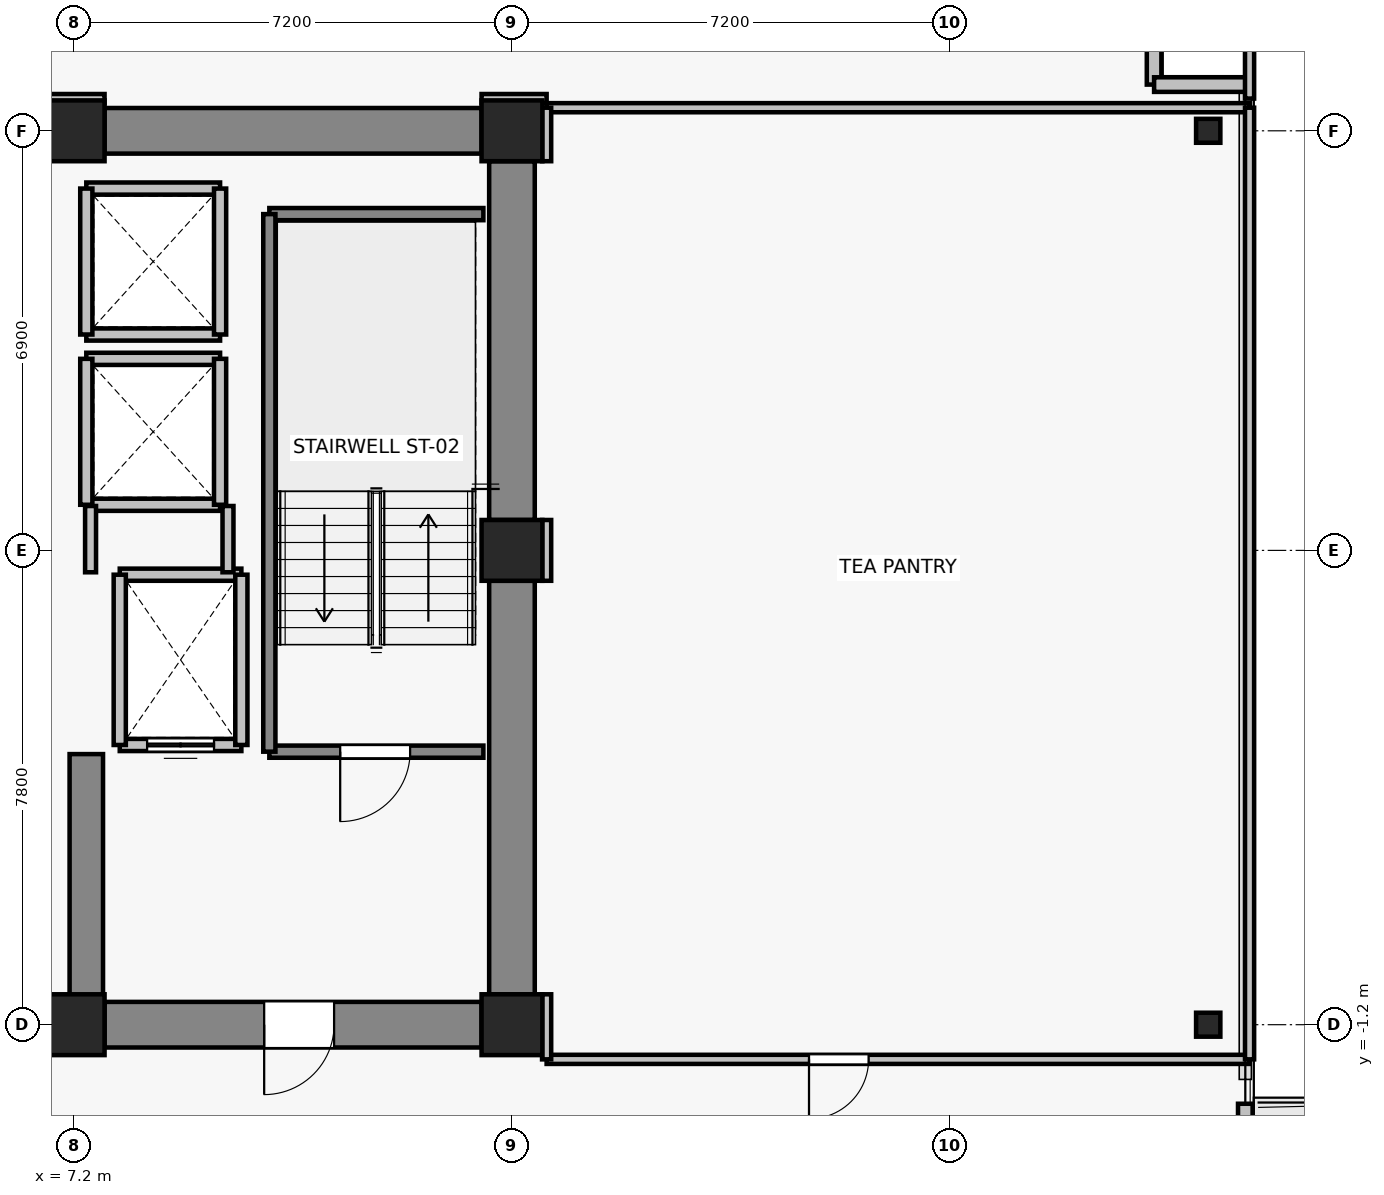
"""IFC4 building model, lengths in metres.
Left out: names, types, materials, properties, quantities, classifications, styles, units other than length and angle.
Written with IfcOpenShell. Run it as: python <this file> out.ifc"""

import sys

from ifc_helpers import new_model, si_unit, direction, frame, frame_2d, origin, origin_2d, place, context, subcontext, project, spatial, rectangle, i_section, extrude, source, transform, mapped, element, fill, save


model = new_model("IFC4")
c1 = context("Model", 3, precision=1e-05, world=origin(), true_north=direction((0.0, 1.0)))
c2 = subcontext(c1, "Body", "Model", "MODEL_VIEW")
j1 = project(units=[si_unit("LENGTHUNIT", "METRE"), si_unit("PLANEANGLEUNIT", "RADIAN")], contexts=[c1])
p1 = place(None, origin())
s1 = spatial("IfcSite", under=j1, at=p1, CompositionType="ELEMENT")
p2 = place(p1, origin())
s2 = spatial("IfcBuilding", under=s1, at=p2, CompositionType="ELEMENT")
p3 = place(p2, frame((0.0, 0.0, 175.9)))
s3 = spatial("IfcBuildingStorey", under=s2, at=p3, CompositionType="ELEMENT", Elevation=175.9)
for number, where, z_axis, x_axis in (
    (1, (7.2, -1.2, 0.0), (0.0, 0.0, 1.0), (1.0, 0.0, 0.0)),
    (2, (14.4, -1.2, 0.0), (0.0, 0.0, 1.0), (1.0, 0.0, 0.0)),
    (3, (14.4, 6.6, 0.0), (0.0, 0.0, 1.0), (1.0, 0.0, 0.0)),
    (4, (7.2, 13.5, 0.0), (0.0, 0.0, 1.0), (1.0, 0.0, 0.0)),
    (5, (14.4, 13.5, 0.0), (0.0, 0.0, 1.0), (1.0, 0.0, 0.0)),
):
    element("IfcColumn", number, at=place(p3, frame(where, z_axis=z_axis, x_axis=x_axis)), inside=s3, PredefinedType="COLUMN", context=c2, shape_type="SweptSolid", body=[
        extrude(rectangle(XDim=1.0, YDim=1.0, at=origin_2d()), origin(), (0.0, 0.0, 1.0), 3.3),
    ])
for number, where, z_axis, x_axis in (
    (6, (25.85, -1.2, 0.0), (0.0, 0.0, 1.0), (1.0, 0.0, 0.0)),
    (7, (25.85, 13.5, 0.0), (0.0, 0.0, 1.0), (1.0, 0.0, 0.0)),
):
    element("IfcColumn", number, at=place(p3, frame(where, z_axis=z_axis, x_axis=x_axis)), inside=s3, PredefinedType="COLUMN", context=c2, shape_type="SweptSolid", body=[
        extrude(i_section(OverallWidth=0.399, OverallDepth=0.394, WebThickness=0.023, FlangeThickness=0.037, FilletRadius=0.015, at=origin_2d()), origin(), (0.0, 0.0, 1.0), 3.3),
    ])
p4 = place(p3, frame((7.7, 13.5, 0.0), z_axis=(0.0, 0.0, 1.0), x_axis=(1.0, 0.0, 0.0)))
e8 = element("IfcWall", 8, at=p4, inside=s3, PredefinedType="SHEAR", context=c2, shape_type="SweptSolid", body=[
    extrude(rectangle(XDim=6.2, YDim=0.75, at=frame_2d((3.1, 0.0))), origin(), (0.0, 0.0, 1.0), 3.075),
])
p5 = place(p3, frame((14.4, -0.7, 0.0), z_axis=(0.0, 0.0, 1.0), x_axis=(0.0, 1.0, 0.0)))
e9 = element("IfcWall", 9, at=p5, inside=s3, PredefinedType="SHEAR", context=c2, shape_type="SweptSolid", body=[
    extrude(rectangle(XDim=6.8, YDim=0.75, at=frame_2d((3.4, 0.0))), origin(), (0.0, 0.0, 1.0), 3.075),
])
p6 = place(p3, frame((14.4, 7.1, 0.0), z_axis=(0.0, 0.0, 1.0), x_axis=(0.0, 1.0, 0.0)))
e10 = element("IfcWall", 10, at=p6, inside=s3, PredefinedType="SHEAR", context=c2, shape_type="SweptSolid", body=[
    extrude(rectangle(XDim=5.9, YDim=0.75, at=frame_2d((2.95, 0.0))), origin(), (0.0, 0.0, 1.0), 3.075),
])
p7 = place(p3, frame((13.9, -1.2, 0.0), z_axis=(0.0, 0.0, 1.0), x_axis=(-1.0, 0.0, 0.0)))
e11 = element("IfcWall", 11, at=p7, inside=s3, PredefinedType="SHEAR", context=c2, shape_type="SweptSolid", body=[
    extrude(rectangle(XDim=6.2, YDim=0.75, at=frame_2d((3.1, 0.0))), origin(), (0.0, 0.0, 1.0), 3.075),
])
p8 = place(p7, frame((2.425, 0.0, 0.0)))
e12 = element("IfcOpeningElement", 12, at=p8, cuts=e11, PredefinedType="OPENING", context=c2, shape_type="SweptSolid", body=[
    extrude(rectangle(XDim=1.15, YDim=2.15, at=frame_2d((0.575, 1.075))), frame((0.0, 0.385, 0.0), z_axis=(0.0, -1.0, 0.0), x_axis=(1.0, 0.0, 0.0)), (0.0, 0.0, 1.0), 0.77),
])
p9 = place(p3, frame((7.4, -0.825, 0.0), z_axis=(0.0, 0.0, 1.0), x_axis=(0.0, 1.0, 0.0)))
e13 = element("IfcWall", 13, at=p9, inside=s3, PredefinedType="SHEAR", context=c2, shape_type="SweptSolid", body=[
    extrude(rectangle(XDim=4.075, YDim=0.55, at=frame_2d((2.038, 0.0))), origin(), (0.0, 0.0, 1.0), 3.075),
])
p10 = place(p3, frame((26.46, -2.5, 0.0), z_axis=(0.0, 0.0, 1.0), x_axis=(0.0, -1.0, 0.0)))
e14 = element("IfcWall", 14, at=p10, inside=s3, PredefinedType="SOLIDWALL", context=c2, shape_type="SweptSolid", body=[
    extrude(rectangle(XDim=5.8, YDim=0.24, at=frame_2d((2.9, 0.0))), origin(), (0.0, 0.0, 1.0), 3.075),
])
p11 = place(p10, frame((1.566, 0.0, 0.0)))
e15 = element("IfcOpeningElement", 15, at=p11, cuts=e14, PredefinedType="OPENING", context=c2, shape_type="SweptSolid", body=[
    extrude(rectangle(XDim=1.0, YDim=2.2, at=frame_2d((0.5, 1.1))), frame((0.0, 0.13, 0.0), z_axis=(0.0, -1.0, 0.0), x_axis=(1.0, 0.0, 0.0)), (0.0, 0.0, 1.0), 0.26),
])
p12 = place(p10, frame((2.916, 0.0, 0.85)))
e16 = element("IfcOpeningElement", 16, at=p12, cuts=e14, PredefinedType="OPENING", context=c2, shape_type="SweptSolid", body=[
    extrude(rectangle(XDim=1.5, YDim=1.6, at=frame_2d((0.75, 0.8))), frame((0.0, 0.13, 0.0), z_axis=(0.0, -1.0, 0.0), x_axis=(1.0, 0.0, 0.0)), (0.0, 0.0, 1.0), 0.26),
])
for number, where, z_axis, x_axis in (
    (17, (24.96, 14.26, 0.0), (0.0, 0.0, 1.0), (0.0, 1.0, 0.0)),
    (18, (26.46, 14.26, 0.0), (0.0, 0.0, 1.0), (-1.0, 0.0, 0.0)),
):
    element("IfcWall", number, at=place(p3, frame(where, z_axis=z_axis, x_axis=x_axis)), inside=s3, PredefinedType="SOLIDWALL", context=c2, shape_type="SweptSolid", body=[
        extrude(rectangle(XDim=1.5, YDim=0.24, at=frame_2d((0.75, 0.0))), origin(), (0.0, 0.0, 1.0), 3.075),
    ])
p13 = place(p3, frame((9.95, 3.4, 0.0), z_axis=(0.0, 0.0, 1.0), x_axis=(-1.0, 0.0, 0.0)))
e19 = element("IfcWall", 19, at=p13, inside=s3, PredefinedType="SOLIDWALL", context=c2, shape_type="SweptSolid", body=[
    extrude(rectangle(XDim=2.0, YDim=0.2, at=frame_2d((1.0, 0.0))), origin(), (0.0, 0.0, 1.0), 3.075),
])
p14 = place(p13, frame((0.45, 0.0, 0.0)))
e20 = element("IfcOpeningElement", 20, at=p14, cuts=e19, PredefinedType="OPENING", context=c2, shape_type="SweptSolid", body=[
    extrude(rectangle(XDim=1.1, YDim=2.2, at=frame_2d((0.55, 1.1))), frame((0.0, 0.11, 0.0), z_axis=(0.0, -1.0, 0.0), x_axis=(1.0, 0.0, 0.0)), (0.0, 0.0, 1.0), 0.22),
])
p15 = place(p3, frame((7.95, 6.2, 0.0), z_axis=(0.0, 0.0, 1.0), x_axis=(1.0, 0.0, 0.0)))
e21 = element("IfcWall", 21, at=p15, inside=s3, PredefinedType="SOLIDWALL", context=c2, shape_type="SweptSolid", body=[
    extrude(rectangle(XDim=2.0, YDim=0.2, at=frame_2d((1.0, 0.0))), origin(), (0.0, 0.0, 1.0), 3.075),
])
for number, where, z_axis, x_axis in (
    (22, (7.95, 3.4, 0.0), (0.0, 0.0, 1.0), (0.0, 1.0, 0.0)),
    (23, (9.95, 6.2, 0.0), (0.0, 0.0, 1.0), (0.0, -1.0, 0.0)),
):
    element("IfcWall", number, at=place(p3, frame(where, z_axis=z_axis, x_axis=x_axis)), inside=s3, PredefinedType="SOLIDWALL", context=c2, shape_type="SweptSolid", body=[
        extrude(rectangle(XDim=2.8, YDim=0.2, at=frame_2d((1.4, 0.0))), origin(), (0.0, 0.0, 1.0), 3.075),
    ])
for number, where, z_axis, x_axis in (
    (24, (9.6, 7.35, 0.0), (0.0, 0.0, 1.0), (-1.0, 0.0, 0.0)),
    (25, (7.4, 9.75, 0.0), (0.0, 0.0, 1.0), (1.0, 0.0, 0.0)),
):
    element("IfcWall", number, at=place(p3, frame(where, z_axis=z_axis, x_axis=x_axis)), inside=s3, PredefinedType="SOLIDWALL", context=c2, shape_type="SweptSolid", body=[
        extrude(rectangle(XDim=2.2, YDim=0.2, at=frame_2d((1.1, 0.0))), origin(), (0.0, 0.0, 1.0), 2.565),
    ])
p16 = place(p3, frame((7.4, 7.35, 0.0), z_axis=(0.0, 0.0, 1.0), x_axis=(0.0, 1.0, 0.0)))
e26 = element("IfcWall", 26, at=p16, inside=s3, PredefinedType="SOLIDWALL", context=c2, shape_type="SweptSolid", body=[
    extrude(rectangle(XDim=2.4, YDim=0.2, at=frame_2d((1.2, 0.0))), origin(), (0.0, 0.0, 1.0), 2.565),
])
p17 = place(p3, frame((9.6, 9.75, 0.0), z_axis=(0.0, 0.0, 1.0), x_axis=(0.0, -1.0, 0.0)))
e27 = element("IfcWall", 27, at=p17, inside=s3, PredefinedType="SOLIDWALL", context=c2, shape_type="SweptSolid", body=[
    extrude(rectangle(XDim=2.4, YDim=0.2, at=frame_2d((1.2, 0.0))), origin(), (0.0, 0.0, 1.0), 3.075),
])
for number, where, z_axis, x_axis in (
    (28, (9.6, 10.15, 0.0), (0.0, 0.0, 1.0), (-1.0, 0.0, 0.0)),
    (29, (7.4, 12.55, 0.0), (0.0, 0.0, 1.0), (1.0, 0.0, 0.0)),
):
    element("IfcWall", number, at=place(p3, frame(where, z_axis=z_axis, x_axis=x_axis)), inside=s3, PredefinedType="SOLIDWALL", context=c2, shape_type="SweptSolid", body=[
        extrude(rectangle(XDim=2.2, YDim=0.2, at=frame_2d((1.1, 0.0))), origin(), (0.0, 0.0, 1.0), 2.565),
    ])
p18 = place(p3, frame((7.4, 10.15, 0.0), z_axis=(0.0, 0.0, 1.0), x_axis=(0.0, 1.0, 0.0)))
e30 = element("IfcWall", 30, at=p18, inside=s3, PredefinedType="SOLIDWALL", context=c2, shape_type="SweptSolid", body=[
    extrude(rectangle(XDim=2.4, YDim=0.2, at=frame_2d((1.2, 0.0))), origin(), (0.0, 0.0, 1.0), 2.565),
])
p19 = place(p3, frame((9.6, 12.55, 0.0), z_axis=(0.0, 0.0, 1.0), x_axis=(0.0, -1.0, 0.0)))
e31 = element("IfcWall", 31, at=p19, inside=s3, PredefinedType="SOLIDWALL", context=c2, shape_type="SweptSolid", body=[
    extrude(rectangle(XDim=2.4, YDim=0.2, at=frame_2d((1.2, 0.0))), origin(), (0.0, 0.0, 1.0), 3.075),
])
p20 = place(p3, frame((13.93, 3.29, 0.0), z_axis=(0.0, 0.0, 1.0), x_axis=(-1.0, 0.0, 0.0)))
e32 = element("IfcWall", 32, at=p20, inside=s3, PredefinedType="SOLIDWALL", context=c2, shape_type="SweptSolid", body=[
    extrude(rectangle(XDim=3.52, YDim=0.2, at=frame_2d((1.76, 0.0))), origin(), (0.0, 0.0, 1.0), 3.075),
])
p21 = place(p20, frame((1.205, 0.0, 0.0)))
e33 = element("IfcOpeningElement", 33, at=p21, cuts=e32, PredefinedType="OPENING", context=c2, shape_type="SweptSolid", body=[
    extrude(rectangle(XDim=1.15, YDim=2.15, at=frame_2d((0.575, 1.075))), frame((0.0, 0.11, 0.0), z_axis=(0.0, -1.0, 0.0), x_axis=(1.0, 0.0, 0.0)), (0.0, 0.0, 1.0), 0.22),
])
p22 = place(p3, frame((10.41, 12.13, 0.0), z_axis=(0.0, 0.0, 1.0), x_axis=(1.0, 0.0, 0.0)))
e34 = element("IfcWall", 34, at=p22, inside=s3, PredefinedType="SOLIDWALL", context=c2, shape_type="SweptSolid", body=[
    extrude(rectangle(XDim=3.52, YDim=0.2, at=frame_2d((1.76, 0.0))), origin(), (0.0, 0.0, 1.0), 3.075),
])
p23 = place(p3, frame((10.41, 3.29, 0.0), z_axis=(0.0, 0.0, 1.0), x_axis=(0.0, 1.0, 0.0)))
e35 = element("IfcWall", 35, at=p23, inside=s3, PredefinedType="SOLIDWALL", context=c2, shape_type="SweptSolid", body=[
    extrude(rectangle(XDim=8.84, YDim=0.2, at=frame_2d((4.42, 0.0))), origin(), (0.0, 0.0, 1.0), 3.075),
])
p24 = place(p3, frame((7.47, 6.24, 0.0), z_axis=(0.0, 0.0, 1.0), x_axis=(0.0, 1.0, 0.0)))
e36 = element("IfcWall", 36, at=p24, inside=s3, PredefinedType="PARTITIONING", context=c2, shape_type="SweptSolid", body=[
    extrude(rectangle(XDim=1.09, YDim=0.18, at=frame_2d((0.545, 0.0))), origin(), (0.0, 0.0, 1.0), 2.565),
])
p25 = place(p3, frame((9.73, 7.33, 0.0), z_axis=(0.0, 0.0, 1.0), x_axis=(0.0, -1.0, 0.0)))
e37 = element("IfcWall", 37, at=p25, inside=s3, PredefinedType="PARTITIONING", context=c2, shape_type="SweptSolid", body=[
    extrude(rectangle(XDim=1.09, YDim=0.18, at=frame_2d((0.545, 0.0))), origin(), (0.0, 0.0, 1.0), 3.075),
])
p26 = place(p3, frame((26.53, -1.77, 0.0), z_axis=(0.0, 0.0, 1.0), x_axis=(-1.0, 0.0, 0.0)))
e38 = element("IfcWall", 38, at=p26, inside=s3, PredefinedType="PARTITIONING", context=c2, shape_type="SweptSolid", body=[
    extrude(rectangle(XDim=11.56, YDim=0.15, at=frame_2d((5.78, 0.0))), origin(), (0.0, 0.0, 1.0), 2.565),
])
p27 = place(p26, frame((6.265, 0.0, 0.0)))
e39 = element("IfcOpeningElement", 39, at=p27, cuts=e38, PredefinedType="OPENING", context=c2, shape_type="SweptSolid", body=[
    extrude(rectangle(XDim=0.98, YDim=2.15, at=frame_2d((0.49, 1.075))), frame((0.0, 0.085, 0.0), z_axis=(0.0, -1.0, 0.0), x_axis=(1.0, 0.0, 0.0)), (0.0, 0.0, 1.0), 0.17),
])
p28 = place(p3, frame((14.97, 13.88, 0.0), z_axis=(0.0, 0.0, 1.0), x_axis=(1.0, 0.0, 0.0)))
e40 = element("IfcWall", 40, at=p28, inside=s3, PredefinedType="PARTITIONING", context=c2, shape_type="SweptSolid", body=[
    extrude(rectangle(XDim=11.56, YDim=0.15, at=frame_2d((5.78, 0.0))), origin(), (0.0, 0.0, 1.0), 3.075),
])
p29 = place(p3, frame((14.97, -1.77, 0.0), z_axis=(0.0, 0.0, 1.0), x_axis=(0.0, 1.0, 0.0)))
e41 = element("IfcWall", 41, at=p29, inside=s3, PredefinedType="PARTITIONING", context=c2, shape_type="SweptSolid", body=[
    extrude(rectangle(XDim=1.07, YDim=0.15, at=frame_2d((0.535, 0.0))), origin(), (0.0, 0.0, 1.0), 2.565),
])
p30 = place(p3, frame((14.97, 6.1, 0.0), z_axis=(0.0, 0.0, 1.0), x_axis=(0.0, 1.0, 0.0)))
e42 = element("IfcWall", 42, at=p30, inside=s3, PredefinedType="PARTITIONING", context=c2, shape_type="SweptSolid", body=[
    extrude(rectangle(XDim=1.0, YDim=0.15, at=frame_2d((0.5, 0.0))), origin(), (0.0, 0.0, 1.0), 3.075),
])
p31 = place(p3, frame((14.97, 13.0, 0.0), z_axis=(0.0, 0.0, 1.0), x_axis=(0.0, 1.0, 0.0)))
e43 = element("IfcWall", 43, at=p31, inside=s3, PredefinedType="PARTITIONING", context=c2, shape_type="SweptSolid", body=[
    extrude(rectangle(XDim=0.88, YDim=0.15, at=frame_2d((0.44, 0.0))), origin(), (0.0, 0.0, 1.0), 2.565),
])
p32 = place(p3, frame((26.53, 13.88, 0.0), z_axis=(0.0, 0.0, 1.0), x_axis=(0.0, -1.0, 0.0)))
e44 = element("IfcWall", 44, at=p32, inside=s3, PredefinedType="PARTITIONING", context=c2, shape_type="SweptSolid", body=[
    extrude(rectangle(XDim=15.65, YDim=0.15, at=frame_2d((7.825, 0.0))), origin(), (0.0, 0.0, 1.0), 3.075),
])
p33 = place(p3, frame((7.7, 14.03, 0.0), z_axis=(0.0, 0.0, 1.0), x_axis=(-1.0, 0.0, 0.0)))
e45 = element("IfcWall", 45, at=p33, inside=s3, PredefinedType="PARTITIONING", context=c2, shape_type="SweptSolid", body=[
    extrude(rectangle(XDim=1.0, YDim=0.15, at=frame_2d((0.5, 0.0))), origin(), (0.0, 0.0, 1.0), 2.565),
])
p34 = place(p3, frame((14.97, 14.03, 0.0), z_axis=(0.0, 0.0, 1.0), x_axis=(-1.0, 0.0, 0.0)))
e46 = element("IfcWall", 46, at=p34, inside=s3, PredefinedType="PARTITIONING", context=c2, shape_type="SweptSolid", body=[
    extrude(rectangle(XDim=1.07, YDim=0.15, at=frame_2d((0.535, 0.0))), origin(), (0.0, 0.0, 1.0), 2.565),
])
p35 = place(p3, frame((26.53, 17.33, 0.0), z_axis=(0.0, 0.0, 1.0), x_axis=(0.0, -1.0, 0.0)))
e47 = element("IfcWall", 47, at=p35, inside=s3, PredefinedType="PARTITIONING", context=c2, shape_type="SweptSolid", body=[
    extrude(rectangle(XDim=3.3, YDim=0.15, at=frame_2d((1.65, 0.0))), origin(), (0.0, 0.0, 1.0), 3.075),
])
m1 = source(origin(), c2, "Body", "SweptSolid", [
    extrude(rectangle(XDim=1.1, YDim=2.2, at=frame_2d((0.55, 1.1))), frame((0.0, 0.025, 0.0), z_axis=(0.0, -1.0, 0.0), x_axis=(1.0, 0.0, 0.0)), (0.0, 0.0, 1.0), 0.05),
])
p36 = place(p14, origin())
e48 = element("IfcDoor", 48, at=p36, inside=s3, OperationType="DOUBLE_DOOR_SLIDING", PredefinedType="DOOR", context=c2, shape_type="MappedRepresentation", body=[
    mapped(m1, transform((0.0, 0.0, 0.0), x_axis=(1.0, 0.0, 0.0), y_axis=(0.0, 1.0, 0.0), z_axis=(0.0, 0.0, 1.0), scale=1.0)),
])
fill(e20, e48)
m2 = source(origin(), c2, "Body", "SweptSolid", [
    extrude(rectangle(XDim=1.15, YDim=2.15, at=frame_2d((0.575, 1.075))), frame((0.0, 0.025, 0.0), z_axis=(0.0, -1.0, 0.0), x_axis=(1.0, 0.0, 0.0)), (0.0, 0.0, 1.0), 0.05),
])
p37 = place(p21, origin())
e49 = element("IfcDoor", 49, at=p37, inside=s3, OperationType="SINGLE_SWING_RIGHT", PredefinedType="DOOR", context=c2, shape_type="MappedRepresentation", body=[
    mapped(m2, transform((0.0, 0.0, 0.0), x_axis=(1.0, 0.0, 0.0), y_axis=(0.0, 1.0, 0.0), z_axis=(0.0, 0.0, 1.0), scale=1.0)),
])
fill(e33, e49)
p38 = place(p8, origin())
e50 = element("IfcDoor", 50, at=p38, inside=s3, OperationType="SINGLE_SWING_RIGHT", PredefinedType="DOOR", context=c2, shape_type="MappedRepresentation", body=[
    mapped(m2, transform((0.0, 0.0, 0.0), x_axis=(1.0, 0.0, 0.0), y_axis=(0.0, 1.0, 0.0), z_axis=(0.0, 0.0, 1.0), scale=1.0)),
])
fill(e12, e50)
m3 = source(origin(), c2, "Body", "SweptSolid", [
    extrude(rectangle(XDim=0.98, YDim=2.15, at=frame_2d((0.49, 1.075))), frame((0.0, 0.025, 0.0), z_axis=(0.0, -1.0, 0.0), x_axis=(1.0, 0.0, 0.0)), (0.0, 0.0, 1.0), 0.05),
])
p39 = place(p27, origin())
e51 = element("IfcDoor", 51, at=p39, inside=s3, OperationType="SINGLE_SWING_RIGHT", PredefinedType="DOOR", context=c2, shape_type="MappedRepresentation", body=[
    mapped(m3, transform((0.0, 0.0, 0.0), x_axis=(1.0, 0.0, 0.0), y_axis=(0.0, 1.0, 0.0), z_axis=(0.0, 0.0, 1.0), scale=1.0)),
])
fill(e39, e51)
save(model, sys.argv[1])
